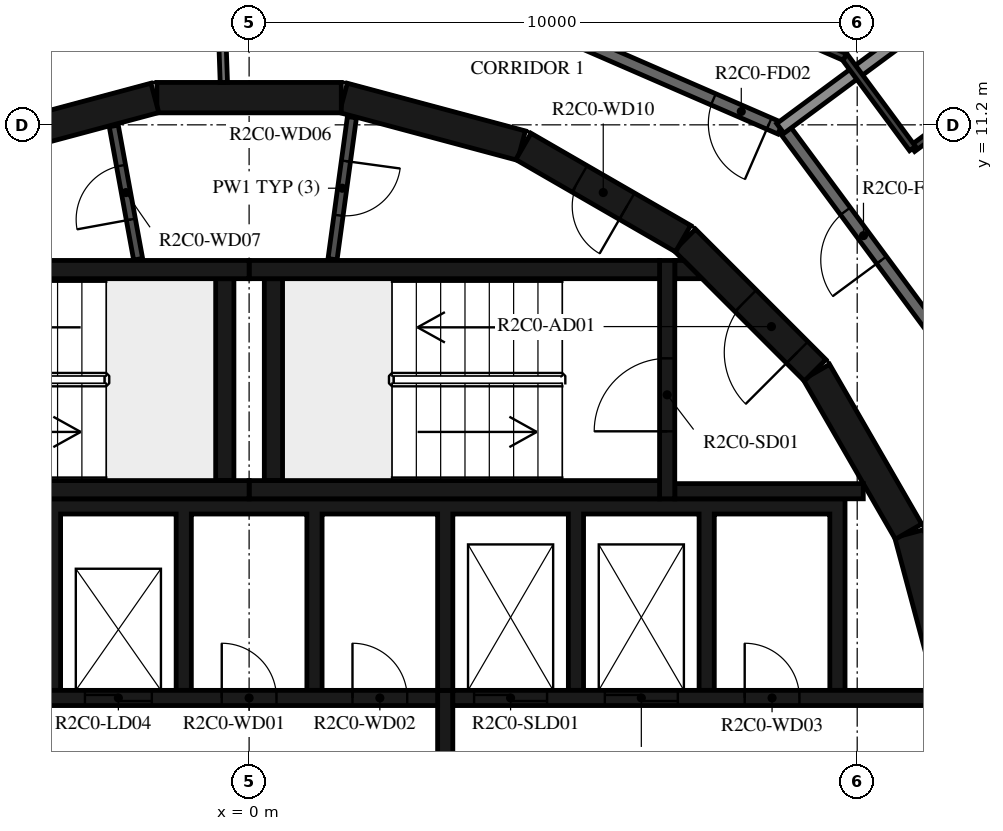
"""IFC4 building model, lengths in metres.
Left out: names, types, materials, properties, quantities, classifications, styles, units other than length and angle.
Written with IfcOpenShell. Run it as: python <this file> out.ifc"""

import sys

from ifc_helpers import new_model, si_unit, direction, frame, frame_2d, origin, place, context, subcontext, project, spatial, polyline, rectangle, outline, extrude, element, fill, save


model = new_model("IFC4")
c1 = context("Model", 3, precision=1e-05, world=origin(), true_north=direction((0.0, 1.0)))
c2 = subcontext(c1, "Body", "Model", "MODEL_VIEW")
j1 = project(units=[si_unit("LENGTHUNIT", "METRE"), si_unit("PLANEANGLEUNIT", "RADIAN")], contexts=[c1])
p1 = place(None, origin())
s1 = spatial("IfcSite", under=j1, at=p1, CompositionType="ELEMENT")
p2 = place(p1, origin())
s2 = spatial("IfcBuilding", under=s1, at=p2, CompositionType="ELEMENT")
p3 = place(p2, frame((0.0, 0.0, 97.7)))
s3 = spatial("IfcBuildingStorey", under=s2, at=p3, CompositionType="ELEMENT", Elevation=97.7)
for number, where, z_axis, x_axis in (
    (1, (11.643, 1.55, 0.0), (0.0, 0.0, 1.0), (-0.259, 0.966, 0.0)),
    (2, (10.845, 4.51, 0.0), (0.0, 0.0, 1.0), (-0.5, 0.866, 0.0)),
):
    element("IfcWall", number, at=place(p3, frame(where, z_axis=z_axis, x_axis=x_axis)), inside=s3, PredefinedType="SHEAR", context=c2, shape_type="SweptSolid", body=[
        extrude(rectangle(XDim=3.033, YDim=0.5, at=frame_2d((1.516, 0.0))), origin(), (0.0, 0.0, 1.0), 3.12),
    ])
p4 = place(p3, frame((9.308, 7.164, 0.0), z_axis=(0.0, 0.0, 1.0), x_axis=(-0.707106781187, 0.707106781187, 0.0)))
e3 = element("IfcWall", 3, at=p4, inside=s3, PredefinedType="SHEAR", context=c2, shape_type="SweptSolid", body=[
    extrude(rectangle(XDim=3.032, YDim=0.5, at=frame_2d((1.516, 0.0))), origin(), (0.0, 0.0, 1.0), 3.12),
])
p5 = place(p4, frame((0.416, 0.0, 0.0)))
e4 = element("IfcOpeningElement", 4, at=p5, cuts=e3, PredefinedType="OPENING", context=c2, shape_type="SweptSolid", body=[
    extrude(rectangle(XDim=1.2, YDim=2.1, at=frame_2d((0.6, 1.05))), frame((0.0, 0.26, 0.0), z_axis=(0.0, -1.0, 0.0), x_axis=(1.0, 0.0, 0.0)), (0.0, 0.0, 1.0), 0.52),
])
p6 = place(p3, frame((7.137, 9.329, 0.0), z_axis=(0.0, 0.0, 1.0), x_axis=(-0.865975092491, 0.500087131594, 0.0)))
e5 = element("IfcWall", 5, at=p6, inside=s3, PredefinedType="SHEAR", context=c2, shape_type="SweptSolid", body=[
    extrude(rectangle(XDim=3.033, YDim=0.5, at=frame_2d((1.516, 0.0))), origin(), (0.0, 0.0, 1.0), 3.12),
])
p7 = place(p6, frame((1.066, 0.0, 0.0)))
e6 = element("IfcOpeningElement", 6, at=p7, cuts=e5, PredefinedType="OPENING", context=c2, shape_type="SweptSolid", body=[
    extrude(rectangle(XDim=0.9, YDim=2.1, at=frame_2d((0.45, 1.05))), frame((0.0, 0.26, 0.0), z_axis=(0.0, -1.0, 0.0), x_axis=(1.0, 0.0, 0.0)), (0.0, 0.0, 1.0), 0.52),
])
for number, where, z_axis, x_axis in (
    (7, (4.479, 10.858, 0.0), (0.0, 0.0, 1.0), (-0.966, 0.259, 0.0)),
    (8, (1.516, 11.647, 0.0), (0.0, 0.0, 1.0), (-1.0, 0.0, 0.0)),
    (9, (-1.55, 11.643, 0.0), (0.0, 0.0, 1.0), (-0.966, -0.259, 0.0)),
):
    element("IfcWall", number, at=place(p3, frame(where, z_axis=z_axis, x_axis=x_axis)), inside=s3, PredefinedType="SHEAR", context=c2, shape_type="SweptSolid", body=[
        extrude(rectangle(XDim=3.033, YDim=0.5, at=frame_2d((1.516, 0.0))), origin(), (0.0, 0.0, 1.0), 3.12),
    ])
for number, where, z_axis, x_axis in (
    (10, (0.0, 5.2, 0.0), (0.0, 0.0, 1.0), (1.0, 0.0, 0.0)),
    (11, (0.0, 8.82, 0.0), (0.0, 0.0, 1.0), (1.0, 0.0, 0.0)),
):
    element("IfcWall", number, at=place(p3, frame(where, z_axis=z_axis, x_axis=x_axis)), inside=s3, PredefinedType="SHEAR", context=c2, shape_type="SweptSolid", body=[
        extrude(rectangle(XDim=6.75, YDim=0.3, at=frame_2d((3.375, 0.0))), origin(), (0.0, 0.0, 1.0), 3.12),
    ])
p8 = place(p3, frame((0.4, 5.35, 0.0), z_axis=(0.0, 0.0, 1.0), x_axis=(0.0, 1.0, 0.0)))
e12 = element("IfcWall", 12, at=p8, inside=s3, PredefinedType="SHEAR", context=c2, shape_type="SweptSolid", body=[
    extrude(rectangle(XDim=3.32, YDim=0.3, at=frame_2d((1.66, 0.0))), origin(), (0.0, 0.0, 1.0), 3.12),
])
p9 = place(p3, frame((6.875, 5.05, 0.0), z_axis=(0.0, 0.0, 1.0), x_axis=(0.0, 1.0, 0.0)))
e13 = element("IfcWall", 13, at=p9, inside=s3, PredefinedType="SHEAR", context=c2, shape_type="SweptSolid", body=[
    extrude(rectangle(XDim=3.92, YDim=0.25, at=frame_2d((1.96, 0.0))), origin(), (0.0, 0.0, 1.0), 3.12),
])
p10 = place(p9, frame((1.11, 0.0, 0.0)))
e14 = element("IfcOpeningElement", 14, at=p10, cuts=e13, PredefinedType="OPENING", context=c2, shape_type="SweptSolid", body=[
    extrude(rectangle(XDim=1.2, YDim=2.1, at=frame_2d((0.6, 1.05))), frame((0.0, 0.135, 0.0), z_axis=(0.0, -1.0, 0.0), x_axis=(1.0, 0.0, 0.0)), (0.0, 0.0, 1.0), 0.27),
])
p11 = place(p3, frame((7.0, 5.175, 0.0), z_axis=(0.0, 0.0, 1.0), x_axis=(1.0, 0.0, 0.0)))
e15 = element("IfcWall", 15, at=p11, inside=s3, PredefinedType="SHEAR", context=c2, shape_type="SweptSolid", body=[
    extrude(rectangle(XDim=3.1, YDim=0.25, at=frame_2d((1.55, 0.0))), origin(), (0.0, 0.0, 1.0), 3.12),
])
p12 = place(p3, origin())
e16 = element("IfcWall", 16, at=p12, inside=s3, PredefinedType="SHEAR", context=c2, shape_type="SweptSolid", body=[
    extrude(outline(polyline([(7.448, 8.67), (7.0, 8.67), (7.0, 8.97), (7.148, 8.97), (7.448, 8.67)])), origin(), (0.0, 0.0, 1.0), 3.12),
])
for number, where, z_axis, x_axis in (
    (17, (-6.75, 5.2, 0.0), (0.0, 0.0, 1.0), (1.0, 0.0, 0.0)),
    (18, (-6.75, 8.82, 0.0), (0.0, 0.0, 1.0), (1.0, 0.0, 0.0)),
):
    element("IfcWall", number, at=place(p3, frame(where, z_axis=z_axis, x_axis=x_axis)), inside=s3, PredefinedType="SHEAR", context=c2, shape_type="SweptSolid", body=[
        extrude(rectangle(XDim=6.75, YDim=0.3, at=frame_2d((3.375, 0.0))), origin(), (0.0, 0.0, 1.0), 3.12),
    ])
p13 = place(p3, frame((-0.4, 5.35, 0.0), z_axis=(0.0, 0.0, 1.0), x_axis=(0.0, 1.0, 0.0)))
e19 = element("IfcWall", 19, at=p13, inside=s3, PredefinedType="SHEAR", context=c2, shape_type="SweptSolid", body=[
    extrude(rectangle(XDim=3.32, YDim=0.3, at=frame_2d((1.66, 0.0))), origin(), (0.0, 0.0, 1.0), 3.12),
])
p14 = place(p3, origin())
e20 = element("IfcWall", 20, at=p14, inside=s3, PredefinedType="SHEAR", context=c2, shape_type="SweptSolid", body=[
    extrude(outline(polyline([(-9.55, 4.8), (-7.65, 4.8), (-7.65, 1.9), (-7.4, 1.9), (-7.4, 4.8), (-5.5, 4.8), (-5.5, 1.9), (-5.25, 1.9), (-5.25, 4.8), (-3.35, 4.8), (-3.35, 1.9), (-3.1, 1.9), (-3.1, 4.8), (-1.2, 4.8), (-1.2, 1.9), (-0.95, 1.9), (-0.95, 4.8), (0.95, 4.8), (0.95, 1.9), (1.2, 1.9), (1.2, 4.8), (3.1, 4.8), (3.1, 1.9), (3.35, 1.9), (3.35, 4.8), (5.25, 4.8), (5.25, 1.9), (5.5, 1.9), (5.5, 4.8), (7.4, 4.8), (7.4, 1.9), (7.65, 1.9), (7.65, 4.8), (9.55, 4.8), (9.55, 1.9), (9.8, 1.9), (9.8, 4.8), (9.8, 5.05), (-9.8, 5.05), (-9.8, 4.8), (-9.8, 1.9), (-9.55, 1.9), (-9.55, 4.8)])), origin(), (0.0, 0.0, 1.0), 3.12),
])
p15 = place(p3, frame((-11.28, 1.775, 0.0), z_axis=(0.0, 0.0, 1.0), x_axis=(1.0, 0.0, 0.0)))
e21 = element("IfcWall", 21, at=p15, inside=s3, PredefinedType="SHEAR", context=c2, shape_type="SweptSolid", body=[
    extrude(rectangle(XDim=14.38, YDim=0.25, at=frame_2d((7.19, 0.0))), origin(), (0.0, 0.0, 1.0), 3.12),
])
p16 = place(p15, frame((2.13, 0.0, 0.0)))
e22 = element("IfcOpeningElement", 22, at=p16, cuts=e21, PredefinedType="OPENING", context=c2, shape_type="SweptSolid", body=[
    extrude(rectangle(XDim=1.1, YDim=2.1, at=frame_2d((0.55, 1.05))), frame((0.0, 0.135, 0.0), z_axis=(0.0, -1.0, 0.0), x_axis=(1.0, 0.0, 0.0)), (0.0, 0.0, 1.0), 0.27),
])
p17 = place(p15, frame((4.28, 0.0, 0.0)))
e23 = element("IfcOpeningElement", 23, at=p17, cuts=e21, PredefinedType="OPENING", context=c2, shape_type="SweptSolid", body=[
    extrude(rectangle(XDim=1.1, YDim=2.1, at=frame_2d((0.55, 1.05))), frame((0.0, 0.135, 0.0), z_axis=(0.0, -1.0, 0.0), x_axis=(1.0, 0.0, 0.0)), (0.0, 0.0, 1.0), 0.27),
])
p18 = place(p15, frame((6.43, 0.0, 0.0)))
e24 = element("IfcOpeningElement", 24, at=p18, cuts=e21, PredefinedType="OPENING", context=c2, shape_type="SweptSolid", body=[
    extrude(rectangle(XDim=1.1, YDim=2.1, at=frame_2d((0.55, 1.05))), frame((0.0, 0.135, 0.0), z_axis=(0.0, -1.0, 0.0), x_axis=(1.0, 0.0, 0.0)), (0.0, 0.0, 1.0), 0.27),
])
p19 = place(p15, frame((8.58, 0.0, 0.0)))
e25 = element("IfcOpeningElement", 25, at=p19, cuts=e21, PredefinedType="OPENING", context=c2, shape_type="SweptSolid", body=[
    extrude(rectangle(XDim=1.1, YDim=2.1, at=frame_2d((0.55, 1.05))), frame((0.0, 0.135, 0.0), z_axis=(0.0, -1.0, 0.0), x_axis=(1.0, 0.0, 0.0)), (0.0, 0.0, 1.0), 0.27),
])
p20 = place(p15, frame((10.83, 0.0, 0.0)))
e26 = element("IfcOpeningElement", 26, at=p20, cuts=e21, PredefinedType="OPENING", context=c2, shape_type="SweptSolid", body=[
    extrude(rectangle(XDim=0.9, YDim=2.1, at=frame_2d((0.45, 1.05))), frame((0.0, 0.135, 0.0), z_axis=(0.0, -1.0, 0.0), x_axis=(1.0, 0.0, 0.0)), (0.0, 0.0, 1.0), 0.27),
])
p21 = place(p15, frame((12.98, 0.0, 0.0)))
e27 = element("IfcOpeningElement", 27, at=p21, cuts=e21, PredefinedType="OPENING", context=c2, shape_type="SweptSolid", body=[
    extrude(rectangle(XDim=0.9, YDim=2.1, at=frame_2d((0.45, 1.05))), frame((0.0, 0.135, 0.0), z_axis=(0.0, -1.0, 0.0), x_axis=(1.0, 0.0, 0.0)), (0.0, 0.0, 1.0), 0.27),
])
p22 = place(p3, frame((3.35, 1.775, 0.0), z_axis=(0.0, 0.0, 1.0), x_axis=(1.0, 0.0, 0.0)))
e28 = element("IfcWall", 28, at=p22, inside=s3, PredefinedType="SHEAR", context=c2, shape_type="SweptSolid", body=[
    extrude(rectangle(XDim=7.93, YDim=0.25, at=frame_2d((3.965, 0.0))), origin(), (0.0, 0.0, 1.0), 3.12),
])
p23 = place(p22, frame((0.35, 0.0, 0.0)))
e29 = element("IfcOpeningElement", 29, at=p23, cuts=e28, PredefinedType="OPENING", context=c2, shape_type="SweptSolid", body=[
    extrude(rectangle(XDim=1.2, YDim=2.4, at=frame_2d((0.6, 1.2))), frame((0.0, 0.135, 0.0), z_axis=(0.0, -1.0, 0.0), x_axis=(1.0, 0.0, 0.0)), (0.0, 0.0, 1.0), 0.27),
])
p24 = place(p22, frame((2.5, 0.0, 0.0)))
e30 = element("IfcOpeningElement", 30, at=p24, cuts=e28, PredefinedType="OPENING", context=c2, shape_type="SweptSolid", body=[
    extrude(rectangle(XDim=1.2, YDim=2.4, at=frame_2d((0.6, 1.2))), frame((0.0, 0.135, 0.0), z_axis=(0.0, -1.0, 0.0), x_axis=(1.0, 0.0, 0.0)), (0.0, 0.0, 1.0), 0.27),
])
p25 = place(p22, frame((4.8, 0.0, 0.0)))
e31 = element("IfcOpeningElement", 31, at=p25, cuts=e28, PredefinedType="OPENING", context=c2, shape_type="SweptSolid", body=[
    extrude(rectangle(XDim=0.9, YDim=2.1, at=frame_2d((0.45, 1.05))), frame((0.0, 0.135, 0.0), z_axis=(0.0, -1.0, 0.0), x_axis=(1.0, 0.0, 0.0)), (0.0, 0.0, 1.0), 0.27),
])
p26 = place(p3, frame((3.225, -1.9, 0.0), z_axis=(0.0, 0.0, 1.0), x_axis=(0.0, 1.0, 0.0)))
e32 = element("IfcWall", 32, at=p26, inside=s3, PredefinedType="SHEAR", context=c2, shape_type="SweptSolid", body=[
    extrude(rectangle(XDim=3.8, YDim=0.25, at=frame_2d((1.9, 0.0))), origin(), (0.0, 0.0, 1.0), 3.12),
])
p27 = place(p3, frame((1.691, 11.326, 0.0), z_axis=(0.0, 0.0, 1.0), x_axis=(-0.135344253201, -0.990798633994, 0.0)))
e33 = element("IfcWall", 33, at=p27, inside=s3, PredefinedType="PARTITIONING", context=c2, shape_type="SweptSolid", body=[
    extrude(rectangle(XDim=2.358, YDim=0.15, at=frame_2d((1.179, 0.0))), origin(), (0.0, 0.0, 1.0), 3.12),
])
p28 = place(p27, frame((0.729, 0.0, 0.0)))
e34 = element("IfcOpeningElement", 34, at=p28, cuts=e33, PredefinedType="OPENING", context=c2, shape_type="SweptSolid", body=[
    extrude(rectangle(XDim=0.9, YDim=2.1, at=frame_2d((0.45, 1.05))), frame((0.0, 0.085, 0.0), z_axis=(0.0, -1.0, 0.0), x_axis=(1.0, 0.0, 0.0)), (0.0, 0.0, 1.0), 0.17),
])
p29 = place(p3, frame((-1.825, 8.99, 0.0), z_axis=(0.0, 0.0, 1.0), x_axis=(-0.179955206115, 0.983674805915, 0.0)))
e35 = element("IfcWall", 35, at=p29, inside=s3, PredefinedType="PARTITIONING", context=c2, shape_type="SweptSolid", body=[
    extrude(rectangle(XDim=2.229, YDim=0.15, at=frame_2d((1.115, 0.0))), origin(), (0.0, 0.0, 1.0), 3.12),
])
p30 = place(p29, frame((0.665, 0.0, 0.0)))
e36 = element("IfcOpeningElement", 36, at=p30, cuts=e35, PredefinedType="OPENING", context=c2, shape_type="SweptSolid", body=[
    extrude(rectangle(XDim=0.9, YDim=2.1, at=frame_2d((0.45, 1.05))), frame((0.0, 0.085, 0.0), z_axis=(0.0, -1.0, 0.0), x_axis=(1.0, 0.0, 0.0)), (0.0, 0.0, 1.0), 0.17),
])
p31 = place(p3, frame((-0.479, 13.734, 0.0), z_axis=(0.0, 0.0, 1.0), x_axis=(0.034805430832, -0.999394107439, 0.0)))
e37 = element("IfcWall", 37, at=p31, inside=s3, PredefinedType="PARTITIONING", context=c2, shape_type="SweptSolid", body=[
    extrude(rectangle(XDim=1.838, YDim=0.12, at=frame_2d((0.919, 0.0))), origin(), (0.0, 0.0, 1.0), 3.12),
])
p32 = place(p31, frame((0.115, 0.0, 0.0)))
e38 = element("IfcOpeningElement", 38, at=p32, cuts=e37, PredefinedType="OPENING", context=c2, shape_type="SweptSolid", body=[
    extrude(rectangle(XDim=1.2, YDim=2.1, at=frame_2d((0.6, 1.05))), frame((0.0, 0.07, 0.0), z_axis=(0.0, -1.0, 0.0), x_axis=(1.0, 0.0, 0.0)), (0.0, 0.0, 1.0), 0.14),
])
p33 = place(p3, frame((13.196, 5.198, 0.0), z_axis=(0.0, 0.0, 1.0), x_axis=(-0.594805187394, 0.803869883159, 0.0)))
e39 = element("IfcWall", 39, at=p33, inside=s3, PredefinedType="STANDARD", context=c2, shape_type="SweptSolid", body=[
    extrude(rectangle(XDim=7.342, YDim=0.2, at=frame_2d((3.671, 0.0))), origin(), (0.0, 0.0, 1.0), 3.12),
])
p34 = place(p33, frame((4.7, 0.0, 0.0)))
e40 = element("IfcOpeningElement", 40, at=p34, cuts=e39, PredefinedType="OPENING", context=c2, shape_type="SweptSolid", body=[
    extrude(rectangle(XDim=1.0, YDim=2.1, at=frame_2d((0.5, 1.05))), frame((0.0, 0.11, 0.0), z_axis=(0.0, -1.0, 0.0), x_axis=(1.0, 0.0, 0.0)), (0.0, 0.0, 1.0), 0.22),
])
p35 = place(p3, frame((8.736, 11.141, 0.0), z_axis=(0.0, 0.0, 1.0), x_axis=(-0.917051290697, 0.398769269416, 0.0)))
e41 = element("IfcWall", 41, at=p35, inside=s3, PredefinedType="STANDARD", context=c2, shape_type="SweptSolid", body=[
    extrude(rectangle(XDim=7.24, YDim=0.2, at=frame_2d((3.62, 0.0))), origin(), (0.0, 0.0, 1.0), 3.12),
])
p36 = place(p35, frame((0.2, 0.0, 0.0)))
e42 = element("IfcOpeningElement", 42, at=p36, cuts=e41, PredefinedType="OPENING", context=c2, shape_type="SweptSolid", body=[
    extrude(rectangle(XDim=1.0, YDim=2.1, at=frame_2d((0.5, 1.05))), frame((0.0, 0.11, 0.0), z_axis=(0.0, -1.0, 0.0), x_axis=(1.0, 0.0, 0.0)), (0.0, 0.0, 1.0), 0.22),
])
p37 = place(p3, frame((13.244, 14.477, 0.0), z_axis=(0.0, 0.0, 1.0), x_axis=(-0.803853971109, -0.594826691677, 0.0)))
e43 = element("IfcWall", 43, at=p37, inside=s3, PredefinedType="STANDARD", context=c2, shape_type="SweptSolid", body=[
    extrude(rectangle(XDim=5.609, YDim=0.2, at=frame_2d((2.804, 0.0))), origin(), (0.0, 0.0, 1.0), 2.73),
])
p38 = place(p3, frame((11.831, 11.492, 0.0), z_axis=(0.0, 0.0, 1.0), x_axis=(-0.803843936653, -0.59484025209, 0.0)))
e44 = element("IfcWall", 44, at=p38, inside=s3, PredefinedType="PARTITIONING", context=c2, shape_type="SweptSolid", body=[
    extrude(rectangle(XDim=1.146, YDim=0.12, at=frame_2d((0.573, 0.0))), origin(), (0.0, 0.0, 1.0), 3.12),
])
p39 = place(p3, frame((10.91, 10.81, 0.0), z_axis=(0.0, 0.0, 1.0), x_axis=(-0.59489693125, 0.803801991282, 0.0)))
e45 = element("IfcWall", 45, at=p39, inside=s3, PredefinedType="PARTITIONING", context=c2, shape_type="SweptSolid", body=[
    extrude(rectangle(XDim=1.872, YDim=0.12, at=frame_2d((0.936, 0.0))), origin(), (0.0, 0.0, 1.0), 3.12),
])
p40 = place(p3, frame((9.796, 12.315, 0.0), z_axis=(0.0, 0.0, 1.0), x_axis=(-0.917059572812, 0.398750222463, 0.0)))
e46 = element("IfcWall", 46, at=p40, inside=s3, PredefinedType="PARTITIONING", context=c2, shape_type="SweptSolid", body=[
    extrude(rectangle(XDim=8.146, YDim=0.12, at=frame_2d((4.073, 0.0))), origin(), (0.0, 0.0, 1.0), 3.12),
])
p41 = place(p40, frame((2.185, 0.0, 0.0)))
e47 = element("IfcOpeningElement", 47, at=p41, cuts=e46, PredefinedType="OPENING", context=c2, shape_type="SweptSolid", body=[
    extrude(rectangle(XDim=0.8, YDim=2.1, at=frame_2d((0.4, 1.05))), frame((0.0, 0.07, 0.0), z_axis=(0.0, -1.0, 0.0), x_axis=(1.0, 0.0, 0.0)), (0.0, 0.0, 1.0), 0.14),
])
p42 = place(p10, origin())
e48 = element("IfcDoor", 48, at=p42, inside=s3, OperationType="SINGLE_SWING_LEFT", PredefinedType="DOOR", context=c2, shape_type="SweptSolid", body=[
    extrude(rectangle(XDim=1.2, YDim=2.1, at=frame_2d((0.6, 1.05))), frame((0.0, 0.025, 0.0), z_axis=(0.0, -1.0, 0.0), x_axis=(1.0, 0.0, 0.0)), (0.0, 0.0, 1.0), 0.05),
])
fill(e14, e48)
p43 = place(p5, origin())
e49 = element("IfcDoor", 49, at=p43, inside=s3, OperationType="SINGLE_SWING_RIGHT", PredefinedType="DOOR", context=c2, shape_type="SweptSolid", body=[
    extrude(rectangle(XDim=1.2, YDim=2.1, at=frame_2d((0.6, 1.05))), frame((0.0, 0.025, 0.0), z_axis=(0.0, -1.0, 0.0), x_axis=(1.0, 0.0, 0.0)), (0.0, 0.0, 1.0), 0.05),
])
fill(e4, e49)
p44 = place(p19, origin())
e50 = element("IfcDoor", 50, at=p44, inside=s3, OperationType="DOUBLE_DOOR_SLIDING", PredefinedType="DOOR", context=c2, shape_type="SweptSolid", body=[
    extrude(rectangle(XDim=1.1, YDim=2.1, at=frame_2d((0.55, 1.05))), frame((0.0, 0.025, 0.0), z_axis=(0.0, -1.0, 0.0), x_axis=(1.0, 0.0, 0.0)), (0.0, 0.0, 1.0), 0.05),
])
fill(e25, e50)
p45 = place(p23, origin())
e51 = element("IfcDoor", 51, at=p45, inside=s3, OperationType="DOUBLE_DOOR_SLIDING", PredefinedType="DOOR", context=c2, shape_type="SweptSolid", body=[
    extrude(rectangle(XDim=1.2, YDim=2.4, at=frame_2d((0.6, 1.2))), frame((0.0, 0.025, 0.0), z_axis=(0.0, -1.0, 0.0), x_axis=(1.0, 0.0, 0.0)), (0.0, 0.0, 1.0), 0.05),
])
fill(e29, e51)
p46 = place(p24, origin())
e52 = element("IfcDoor", 52, at=p46, inside=s3, OperationType="DOUBLE_DOOR_SLIDING", PredefinedType="DOOR", context=c2, shape_type="SweptSolid", body=[
    extrude(rectangle(XDim=1.2, YDim=2.4, at=frame_2d((0.6, 1.2))), frame((0.0, 0.025, 0.0), z_axis=(0.0, -1.0, 0.0), x_axis=(1.0, 0.0, 0.0)), (0.0, 0.0, 1.0), 0.05),
])
fill(e30, e52)
p47 = place(p20, origin())
e53 = element("IfcDoor", 53, at=p47, inside=s3, OperationType="SINGLE_SWING_RIGHT", PredefinedType="DOOR", context=c2, shape_type="SweptSolid", body=[
    extrude(rectangle(XDim=0.9, YDim=2.1, at=frame_2d((0.45, 1.05))), frame((0.0, 0.025, 0.0), z_axis=(0.0, -1.0, 0.0), x_axis=(1.0, 0.0, 0.0)), (0.0, 0.0, 1.0), 0.05),
])
fill(e26, e53)
p48 = place(p21, origin())
e54 = element("IfcDoor", 54, at=p48, inside=s3, OperationType="SINGLE_SWING_LEFT", PredefinedType="DOOR", context=c2, shape_type="SweptSolid", body=[
    extrude(rectangle(XDim=0.9, YDim=2.1, at=frame_2d((0.45, 1.05))), frame((0.0, 0.025, 0.0), z_axis=(0.0, -1.0, 0.0), x_axis=(1.0, 0.0, 0.0)), (0.0, 0.0, 1.0), 0.05),
])
fill(e27, e54)
p49 = place(p25, origin())
e55 = element("IfcDoor", 55, at=p49, inside=s3, OperationType="SINGLE_SWING_RIGHT", PredefinedType="DOOR", context=c2, shape_type="SweptSolid", body=[
    extrude(rectangle(XDim=0.9, YDim=2.1, at=frame_2d((0.45, 1.05))), frame((0.0, 0.025, 0.0), z_axis=(0.0, -1.0, 0.0), x_axis=(1.0, 0.0, 0.0)), (0.0, 0.0, 1.0), 0.05),
])
fill(e31, e55)
p50 = place(p28, origin())
e56 = element("IfcDoor", 56, at=p50, inside=s3, OperationType="SINGLE_SWING_LEFT", PredefinedType="DOOR", context=c2, shape_type="SweptSolid", body=[
    extrude(rectangle(XDim=0.9, YDim=2.1, at=frame_2d((0.45, 1.05))), frame((0.0, 0.025, 0.0), z_axis=(0.0, -1.0, 0.0), x_axis=(1.0, 0.0, 0.0)), (0.0, 0.0, 1.0), 0.05),
])
fill(e34, e56)
p51 = place(p30, origin())
e57 = element("IfcDoor", 57, at=p51, inside=s3, OperationType="SINGLE_SWING_RIGHT", PredefinedType="DOOR", context=c2, shape_type="SweptSolid", body=[
    extrude(rectangle(XDim=0.9, YDim=2.1, at=frame_2d((0.45, 1.05))), frame((0.0, 0.025, 0.0), z_axis=(0.0, -1.0, 0.0), x_axis=(1.0, 0.0, 0.0)), (0.0, 0.0, 1.0), 0.05),
])
fill(e36, e57)
p52 = place(p7, origin())
e58 = element("IfcDoor", 58, at=p52, inside=s3, OperationType="SINGLE_SWING_LEFT", PredefinedType="DOOR", context=c2, shape_type="SweptSolid", body=[
    extrude(rectangle(XDim=0.9, YDim=2.1, at=frame_2d((0.45, 1.05))), frame((0.0, 0.025, 0.0), z_axis=(0.0, -1.0, 0.0), x_axis=(1.0, 0.0, 0.0)), (0.0, 0.0, 1.0), 0.05),
])
fill(e6, e58)
p53 = place(p34, origin())
e59 = element("IfcDoor", 59, at=p53, inside=s3, OperationType="SINGLE_SWING_RIGHT", PredefinedType="DOOR", context=c2, shape_type="SweptSolid", body=[
    extrude(rectangle(XDim=1.0, YDim=2.1, at=frame_2d((0.5, 1.05))), frame((0.0, 0.025, 0.0), z_axis=(0.0, -1.0, 0.0), x_axis=(1.0, 0.0, 0.0)), (0.0, 0.0, 1.0), 0.05),
])
fill(e40, e59)
p54 = place(p36, origin())
e60 = element("IfcDoor", 60, at=p54, inside=s3, OperationType="SINGLE_SWING_RIGHT", PredefinedType="DOOR", context=c2, shape_type="SweptSolid", body=[
    extrude(rectangle(XDim=1.0, YDim=2.1, at=frame_2d((0.5, 1.05))), frame((0.0, 0.025, 0.0), z_axis=(0.0, -1.0, 0.0), x_axis=(1.0, 0.0, 0.0)), (0.0, 0.0, 1.0), 0.05),
])
fill(e42, e60)
save(model, sys.argv[1])
